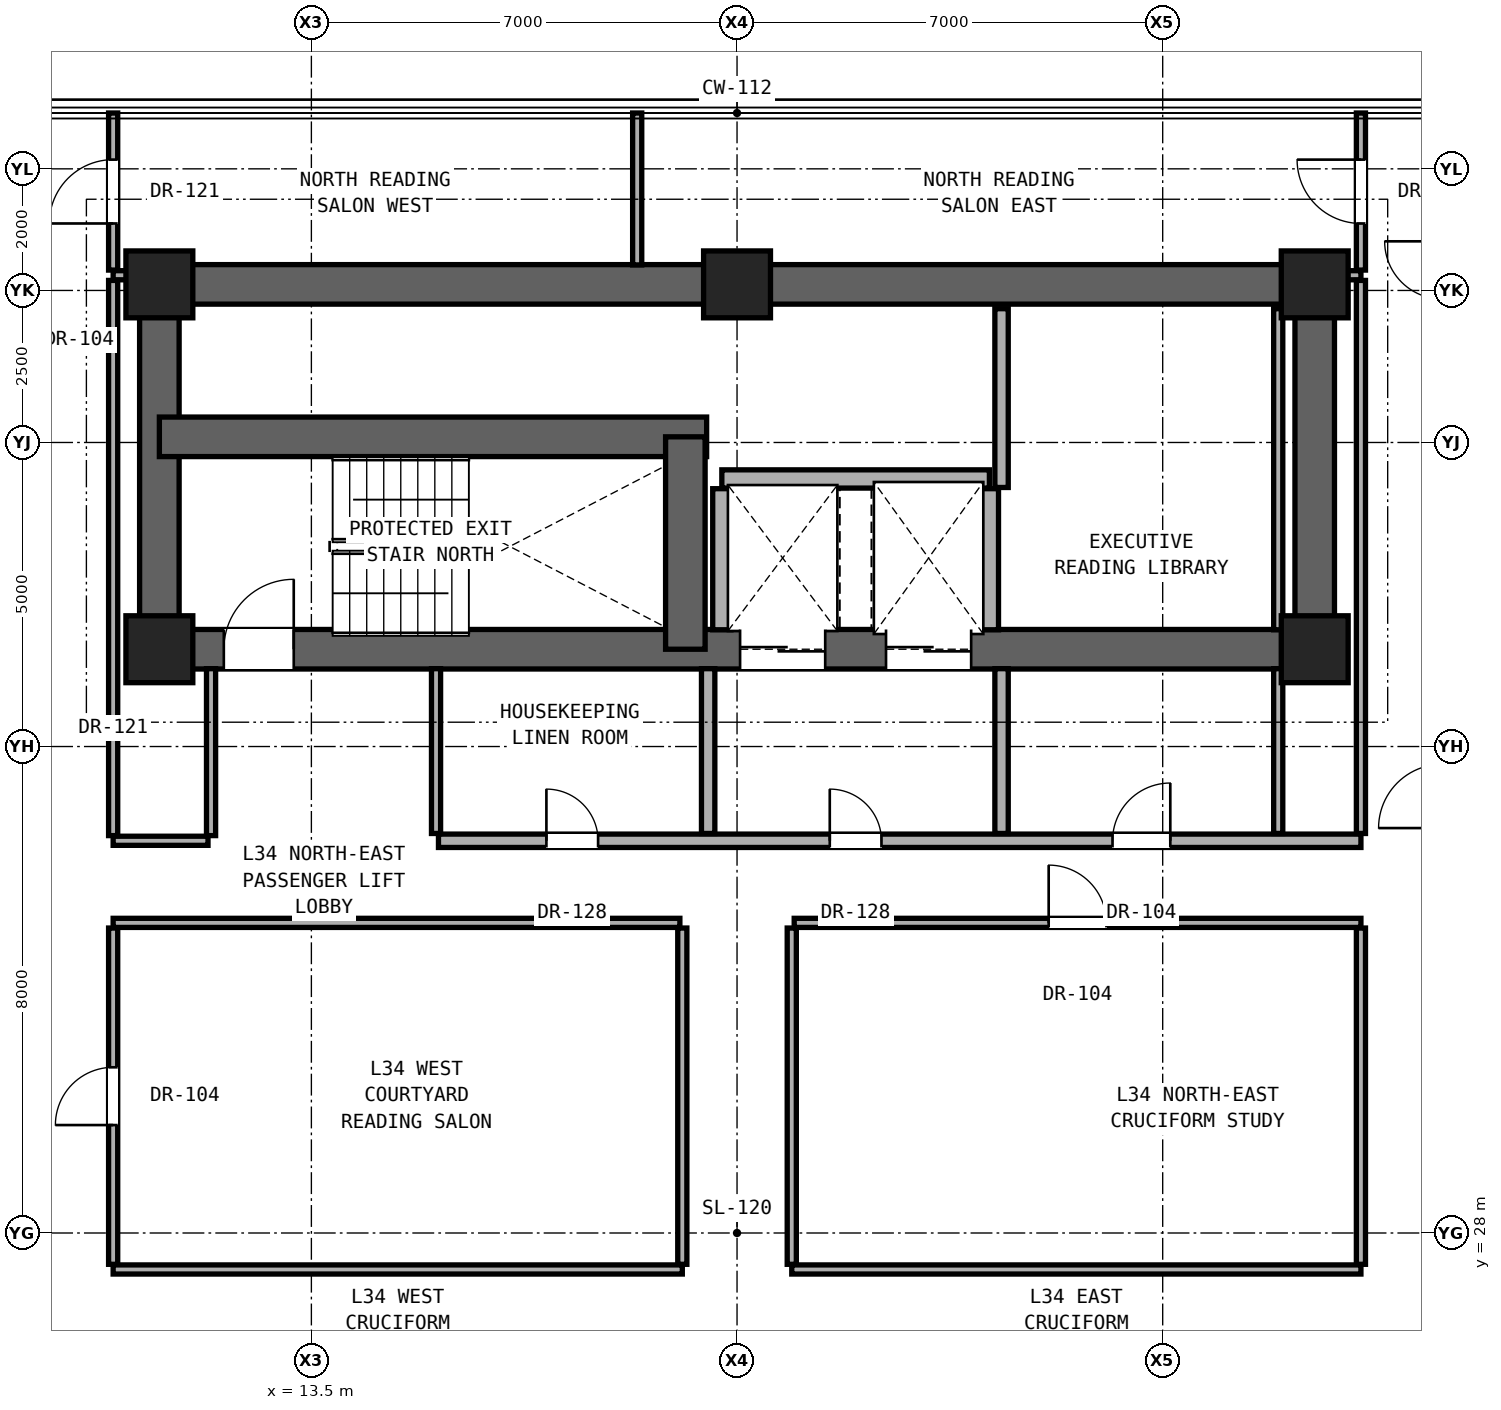
"""IFC4 building model, lengths in metres.
Left out: names, types, materials, properties, quantities, classifications, styles, units other than length and angle.
Written with IfcOpenShell. Run it as: python <this file> out.ifc"""

import sys

from ifc_helpers import new_model, si_unit, direction, frame, frame_2d, origin, origin_2d, place, context, subcontext, project, spatial, rectangle, extrude, element, fill, save


model = new_model("IFC4")
c1 = context("Model", 3, precision=1e-05, world=origin(), true_north=direction((0.0, 1.0)))
c2 = subcontext(c1, "Body", "Model", "MODEL_VIEW")
j1 = project(units=[si_unit("LENGTHUNIT", "METRE"), si_unit("PLANEANGLEUNIT", "RADIAN")], contexts=[c1])
p1 = place(None, origin())
s1 = spatial("IfcSite", under=j1, at=p1, CompositionType="ELEMENT")
p2 = place(p1, origin())
s2 = spatial("IfcBuilding", under=s1, at=p2, CompositionType="ELEMENT")
p3 = place(p2, frame((0.0, 0.0, 121.4)))
s3 = spatial("IfcBuildingStorey", under=s2, at=p3, CompositionType="ELEMENT", Elevation=121.4)
for number, where, z_axis, x_axis in (
    (1, (11.0, 37.6, 0.0), (0.0, 0.0, 1.0), (1.0, 0.0, 0.0)),
    (2, (30.0, 37.6, 0.0), (0.0, 0.0, 1.0), (1.0, 0.0, 0.0)),
    (3, (11.0, 43.6, 0.0), (0.0, 0.0, 1.0), (1.0, 0.0, 0.0)),
    (4, (20.5, 43.6, 0.0), (0.0, 0.0, 1.0), (1.0, 0.0, 0.0)),
    (5, (30.0, 43.6, 0.0), (0.0, 0.0, 1.0), (1.0, 0.0, 0.0)),
):
    element("IfcColumn", number, at=place(p3, frame(where, z_axis=z_axis, x_axis=x_axis)), inside=s3, PredefinedType="COLUMN", context=c2, shape_type="SweptSolid", body=[
        extrude(rectangle(XDim=1.1, YDim=1.1, at=origin_2d()), origin(), (0.0, 0.0, 1.0), 3.3),
    ])
p4 = place(p3, frame((11.0, 43.6, 0.0), z_axis=(0.0, 0.0, 1.0), x_axis=(1.0, 0.0, 0.0)))
e6 = element("IfcWall", 6, at=p4, inside=s3, PredefinedType="SHEAR", context=c2, shape_type="SweptSolid", body=[
    extrude(rectangle(XDim=19.0, YDim=0.65, at=frame_2d((9.5, 0.0))), origin(), (0.0, 0.0, 1.0), 3.08),
])
for number, where, z_axis, x_axis in (
    (7, (11.0, 37.6, 0.0), (0.0, 0.0, 1.0), (0.0, 1.0, 0.0)),
    (8, (30.0, 37.6, 0.0), (0.0, 0.0, 1.0), (0.0, 1.0, 0.0)),
):
    element("IfcWall", number, at=place(p3, frame(where, z_axis=z_axis, x_axis=x_axis)), inside=s3, PredefinedType="SHEAR", context=c2, shape_type="SweptSolid", body=[
        extrude(rectangle(XDim=6.0, YDim=0.65, at=frame_2d((3.0, 0.0))), origin(), (0.0, 0.0, 1.0), 3.08),
    ])
p5 = place(p3, frame((11.0, 37.6, 0.0), z_axis=(0.0, 0.0, 1.0), x_axis=(1.0, 0.0, 0.0)))
e9 = element("IfcWall", 9, at=p5, inside=s3, PredefinedType="SHEAR", context=c2, shape_type="SweptSolid", body=[
    extrude(rectangle(XDim=19.0, YDim=0.65, at=frame_2d((9.5, 0.0))), origin(), (0.0, 0.0, 1.0), 3.08),
])
p6 = place(p5, frame((1.06, 0.0, 0.0)))
e10 = element("IfcOpeningElement", 10, at=p6, cuts=e9, PredefinedType="OPENING", context=c2, shape_type="SweptSolid", body=[
    extrude(rectangle(XDim=1.15, YDim=2.2, at=frame_2d((0.575, 1.1))), frame((0.0, 0.335, 0.0), z_axis=(0.0, -1.0, 0.0), x_axis=(1.0, 0.0, 0.0)), (0.0, 0.0, 1.0), 0.67),
])
p7 = place(p5, frame((9.55, 0.0, 0.0)))
e11 = element("IfcOpeningElement", 11, at=p7, cuts=e9, PredefinedType="OPENING", context=c2, shape_type="SweptSolid", body=[
    extrude(rectangle(XDim=1.4, YDim=2.35, at=frame_2d((0.7, 1.175))), frame((0.0, 0.335, 0.0), z_axis=(0.0, -1.0, 0.0), x_axis=(1.0, 0.0, 0.0)), (0.0, 0.0, 1.0), 0.67),
])
p8 = place(p5, frame((11.95, 0.0, 0.0)))
e12 = element("IfcOpeningElement", 12, at=p8, cuts=e9, PredefinedType="OPENING", context=c2, shape_type="SweptSolid", body=[
    extrude(rectangle(XDim=1.4, YDim=2.35, at=frame_2d((0.7, 1.175))), frame((0.0, 0.335, 0.0), z_axis=(0.0, -1.0, 0.0), x_axis=(1.0, 0.0, 0.0)), (0.0, 0.0, 1.0), 0.67),
])
p9 = place(p3, frame((11.0, 41.093, 0.0), z_axis=(0.0, 0.0, 1.0), x_axis=(1.0, 0.0, 0.0)))
e13 = element("IfcWall", 13, at=p9, inside=s3, PredefinedType="SHEAR", context=c2, shape_type="SweptSolid", body=[
    extrude(rectangle(XDim=9.0, YDim=0.65, at=frame_2d((4.5, 0.0))), origin(), (0.0, 0.0, 1.0), 3.08),
])
p10 = place(p3, frame((19.65, 37.6, 0.0), z_axis=(0.0, 0.0, 1.0), x_axis=(0.0, 1.0, 0.0)))
e14 = element("IfcWall", 14, at=p10, inside=s3, PredefinedType="SHEAR", context=c2, shape_type="SweptSolid", body=[
    extrude(rectangle(XDim=3.493, YDim=0.65, at=frame_2d((1.747, 0.0))), origin(), (0.0, 0.0, 1.0), 3.08),
])
for number, where, z_axis, x_axis in (
    (15, (10.24, 27.4, 0.0), (0.0, 0.0, 1.0), (1.0, 0.0, 0.0)),
    (16, (21.4, 27.4, 0.0), (0.0, 0.0, 1.0), (1.0, 0.0, 0.0)),
):
    element("IfcWall", number, at=place(p3, frame(where, z_axis=z_axis, x_axis=x_axis)), inside=s3, PredefinedType="PARTITIONING", context=c2, shape_type="SweptSolid", body=[
        extrude(rectangle(XDim=9.36, YDim=0.15, at=frame_2d((4.68, 0.0))), origin(), (0.0, 0.0, 1.0), 2.216),
    ])
p11 = place(p3, frame((10.24, 33.1, 0.0), z_axis=(0.0, 0.0, 1.0), x_axis=(1.0, 0.0, 0.0)))
e17 = element("IfcWall", 17, at=p11, inside=s3, PredefinedType="PARTITIONING", context=c2, shape_type="SweptSolid", body=[
    extrude(rectangle(XDim=9.32, YDim=0.15, at=frame_2d((4.66, 0.0))), origin(), (0.0, 0.0, 1.0), 2.216),
])
p12 = place(p3, frame((21.44, 33.1, 0.0), z_axis=(0.0, 0.0, 1.0), x_axis=(1.0, 0.0, 0.0)))
e18 = element("IfcWall", 18, at=p12, inside=s3, PredefinedType="PARTITIONING", context=c2, shape_type="SweptSolid", body=[
    extrude(rectangle(XDim=9.32, YDim=0.15, at=frame_2d((4.66, 0.0))), origin(), (0.0, 0.0, 1.0), 2.216),
])
p13 = place(p12, frame((4.185, 0.0, 0.0)))
e19 = element("IfcOpeningElement", 19, at=p13, cuts=e18, PredefinedType="OPENING", context=c2, shape_type="SweptSolid", body=[
    extrude(rectangle(XDim=0.95, YDim=2.15, at=frame_2d((0.475, 1.075))), frame((0.0, 0.085, 0.0), z_axis=(0.0, -1.0, 0.0), x_axis=(1.0, 0.0, 0.0)), (0.0, 0.0, 1.0), 0.17),
])
p14 = place(p3, frame((10.24, 34.45, 0.0), z_axis=(0.0, 0.0, 1.0), x_axis=(1.0, 0.0, 0.0)))
e20 = element("IfcWall", 20, at=p14, inside=s3, PredefinedType="PARTITIONING", context=c2, shape_type="SweptSolid", body=[
    extrude(rectangle(XDim=1.56, YDim=0.15, at=frame_2d((0.78, 0.0))), origin(), (0.0, 0.0, 1.0), 2.216),
])
p15 = place(p3, frame((15.59, 34.45, 0.0), z_axis=(0.0, 0.0, 1.0), x_axis=(1.0, 0.0, 0.0)))
e21 = element("IfcWall", 21, at=p15, inside=s3, PredefinedType="SOLIDWALL", context=c2, shape_type="SweptSolid", body=[
    extrude(rectangle(XDim=15.17, YDim=0.22, at=frame_2d((7.585, 0.0))), origin(), (0.0, 0.0, 1.0), 2.216),
])
p16 = place(p15, frame((6.435, 0.0, 0.0)))
e22 = element("IfcOpeningElement", 22, at=p16, cuts=e21, PredefinedType="OPENING", context=c2, shape_type="SweptSolid", body=[
    extrude(rectangle(XDim=0.85, YDim=2.01, at=frame_2d((0.425, 1.005))), frame((0.0, 0.12, 0.0), z_axis=(0.0, -1.0, 0.0), x_axis=(1.0, 0.0, 0.0)), (0.0, 0.0, 1.0), 0.24),
])
p17 = place(p15, frame((11.085, 0.0, 0.0)))
e23 = element("IfcOpeningElement", 23, at=p17, cuts=e21, PredefinedType="OPENING", context=c2, shape_type="SweptSolid", body=[
    extrude(rectangle(XDim=0.95, YDim=2.15, at=frame_2d((0.475, 1.075))), frame((0.0, 0.12, 0.0), z_axis=(0.0, -1.0, 0.0), x_axis=(1.0, 0.0, 0.0)), (0.0, 0.0, 1.0), 0.24),
])
p18 = place(p15, frame((1.775, 0.0, 0.0)))
e24 = element("IfcOpeningElement", 24, at=p18, cuts=e21, PredefinedType="OPENING", context=c2, shape_type="SweptSolid", body=[
    extrude(rectangle(XDim=0.85, YDim=2.01, at=frame_2d((0.425, 1.005))), frame((0.0, 0.12, 0.0), z_axis=(0.0, -1.0, 0.0), x_axis=(1.0, 0.0, 0.0)), (0.0, 0.0, 1.0), 0.24),
])
p19 = place(p3, frame((20.25, 40.4, 0.0), z_axis=(0.0, 0.0, 1.0), x_axis=(1.0, 0.0, 0.0)))
e25 = element("IfcWall", 25, at=p19, inside=s3, PredefinedType="SOLIDWALL", context=c2, shape_type="SweptSolid", body=[
    extrude(rectangle(XDim=4.4, YDim=0.3, at=frame_2d((2.2, 0.0))), origin(), (0.0, 0.0, 1.0), 3.08),
])
for number, where, z_axis, x_axis in (
    (26, (10.24, 43.75, 0.0), (0.0, 0.0, 1.0), (1.0, 0.0, 0.0)),
    (27, (30.32, 43.75, 0.0), (0.0, 0.0, 1.0), (1.0, 0.0, 0.0)),
):
    element("IfcWall", number, at=place(p3, frame(where, z_axis=z_axis, x_axis=x_axis)), inside=s3, PredefinedType="PARTITIONING", context=c2, shape_type="SweptSolid", body=[
        extrude(rectangle(XDim=0.44, YDim=0.15, at=frame_2d((0.22, 0.0))), origin(), (0.0, 0.0, 1.0), 3.08),
    ])
p20 = place(p3, frame((10.24, 27.485, 0.0), z_axis=(0.0, 0.0, 1.0), x_axis=(0.0, 1.0, 0.0)))
e28 = element("IfcWall", 28, at=p20, inside=s3, PredefinedType="PARTITIONING", context=c2, shape_type="SweptSolid", body=[
    extrude(rectangle(XDim=5.53, YDim=0.15, at=frame_2d((2.765, 0.0))), origin(), (0.0, 0.0, 1.0), 2.299),
])
p21 = place(p20, frame((2.29, 0.0, 0.0)))
e29 = element("IfcOpeningElement", 29, at=p21, cuts=e28, PredefinedType="OPENING", context=c2, shape_type="SweptSolid", body=[
    extrude(rectangle(XDim=0.95, YDim=2.15, at=frame_2d((0.475, 1.075))), frame((0.0, 0.085, 0.0), z_axis=(0.0, -1.0, 0.0), x_axis=(1.0, 0.0, 0.0)), (0.0, 0.0, 1.0), 0.17),
])
p22 = place(p3, frame((10.24, 34.535, 0.0), z_axis=(0.0, 0.0, 1.0), x_axis=(0.0, 1.0, 0.0)))
e30 = element("IfcWall", 30, at=p22, inside=s3, PredefinedType="PARTITIONING", context=c2, shape_type="SweptSolid", body=[
    extrude(rectangle(XDim=9.13, YDim=0.15, at=frame_2d((4.565, 0.0))), origin(), (0.0, 0.0, 1.0), 2.456),
])
p23 = place(p3, frame((10.24, 43.835, 0.0), z_axis=(0.0, 0.0, 1.0), x_axis=(0.0, 1.0, 0.0)))
e31 = element("IfcWall", 31, at=p23, inside=s3, PredefinedType="PARTITIONING", context=c2, shape_type="SweptSolid", body=[
    extrude(rectangle(XDim=2.583, YDim=0.15, at=frame_2d((1.292, 0.0))), origin(), (0.0, 0.0, 1.0), 3.08),
])
p24 = place(p23, frame((0.767, 0.0, 0.0)))
e32 = element("IfcOpeningElement", 32, at=p24, cuts=e31, PredefinedType="OPENING", context=c2, shape_type="SweptSolid", body=[
    extrude(rectangle(XDim=1.05, YDim=2.2, at=frame_2d((0.525, 1.1))), frame((0.0, 0.085, 0.0), z_axis=(0.0, -1.0, 0.0), x_axis=(1.0, 0.0, 0.0)), (0.0, 0.0, 1.0), 0.17),
])
p25 = place(p3, frame((11.85, 34.535, 0.0), z_axis=(0.0, 0.0, 1.0), x_axis=(0.0, 1.0, 0.0)))
e33 = element("IfcWall", 33, at=p25, inside=s3, PredefinedType="PARTITIONING", context=c2, shape_type="SweptSolid", body=[
    extrude(rectangle(XDim=2.745, YDim=0.15, at=frame_2d((1.373, 0.0))), origin(), (0.0, 0.0, 1.0), 3.08),
])
p26 = place(p3, frame((15.55, 34.57, 0.0), z_axis=(0.0, 0.0, 1.0), x_axis=(0.0, 1.0, 0.0)))
e34 = element("IfcWall", 34, at=p26, inside=s3, PredefinedType="PARTITIONING", context=c2, shape_type="SweptSolid", body=[
    extrude(rectangle(XDim=2.71, YDim=0.15, at=frame_2d((1.355, 0.0))), origin(), (0.0, 0.0, 1.0), 2.609),
])
p27 = place(p3, frame((18.858, 43.92, 0.0), z_axis=(0.0, 0.0, 1.0), x_axis=(0.0, 1.0, 0.0)))
e35 = element("IfcWall", 35, at=p27, inside=s3, PredefinedType="PARTITIONING", context=c2, shape_type="SweptSolid", body=[
    extrude(rectangle(XDim=2.498, YDim=0.15, at=frame_2d((1.249, 0.0))), origin(), (0.0, 0.0, 1.0), 3.08),
])
p28 = place(p3, frame((19.6, 27.485, 0.0), z_axis=(0.0, 0.0, 1.0), x_axis=(0.0, 1.0, 0.0)))
e36 = element("IfcWall", 36, at=p28, inside=s3, PredefinedType="PARTITIONING", context=c2, shape_type="SweptSolid", body=[
    extrude(rectangle(XDim=5.53, YDim=0.15, at=frame_2d((2.765, 0.0))), origin(), (0.0, 0.0, 1.0), 2.216),
])
p29 = place(p3, frame((20.025, 34.57, 0.0), z_axis=(0.0, 0.0, 1.0), x_axis=(0.0, 1.0, 0.0)))
e37 = element("IfcWall", 37, at=p29, inside=s3, PredefinedType="SOLIDWALL", context=c2, shape_type="SweptSolid", body=[
    extrude(rectangle(XDim=2.71, YDim=0.22, at=frame_2d((1.355, 0.0))), origin(), (0.0, 0.0, 1.0), 3.08),
])
p30 = place(p3, frame((20.25, 37.92, 0.0), z_axis=(0.0, 0.0, 1.0), x_axis=(0.0, 1.0, 0.0)))
e38 = element("IfcWall", 38, at=p30, inside=s3, PredefinedType="SOLIDWALL", context=c2, shape_type="SweptSolid", body=[
    extrude(rectangle(XDim=2.32, YDim=0.3, at=frame_2d((1.16, 0.0))), origin(), (0.0, 0.0, 1.0), 3.08),
])
p31 = place(p3, frame((21.4, 27.485, 0.0), z_axis=(0.0, 0.0, 1.0), x_axis=(0.0, 1.0, 0.0)))
e39 = element("IfcWall", 39, at=p31, inside=s3, PredefinedType="PARTITIONING", context=c2, shape_type="SweptSolid", body=[
    extrude(rectangle(XDim=5.53, YDim=0.15, at=frame_2d((2.765, 0.0))), origin(), (0.0, 0.0, 1.0), 2.216),
])
p32 = place(p3, frame((24.65, 37.92, 0.0), z_axis=(0.0, 0.0, 1.0), x_axis=(0.0, 1.0, 0.0)))
e40 = element("IfcWall", 40, at=p32, inside=s3, PredefinedType="SOLIDWALL", context=c2, shape_type="SweptSolid", body=[
    extrude(rectangle(XDim=2.32, YDim=0.3, at=frame_2d((1.16, 0.0))), origin(), (0.0, 0.0, 1.0), 3.08),
])
p33 = place(p3, frame((24.85, 34.57, 0.0), z_axis=(0.0, 0.0, 1.0), x_axis=(0.0, 1.0, 0.0)))
e41 = element("IfcWall", 41, at=p33, inside=s3, PredefinedType="SOLIDWALL", context=c2, shape_type="SweptSolid", body=[
    extrude(rectangle(XDim=2.71, YDim=0.22, at=frame_2d((1.355, 0.0))), origin(), (0.0, 0.0, 1.0), 3.08),
])
p34 = place(p3, frame((24.85, 40.26, 0.0), z_axis=(0.0, 0.0, 1.0), x_axis=(0.0, 1.0, 0.0)))
e42 = element("IfcWall", 42, at=p34, inside=s3, PredefinedType="SOLIDWALL", context=c2, shape_type="SweptSolid", body=[
    extrude(rectangle(XDim=2.94, YDim=0.22, at=frame_2d((1.47, 0.0))), origin(), (0.0, 0.0, 1.0), 3.08),
])
p35 = place(p3, frame((29.4, 34.57, 0.0), z_axis=(0.0, 0.0, 1.0), x_axis=(0.0, 1.0, 0.0)))
e43 = element("IfcWall", 43, at=p35, inside=s3, PredefinedType="PARTITIONING", context=c2, shape_type="SweptSolid", body=[
    extrude(rectangle(XDim=2.71, YDim=0.15, at=frame_2d((1.355, 0.0))), origin(), (0.0, 0.0, 1.0), 3.08),
])
p36 = place(p3, frame((29.4, 37.92, 0.0), z_axis=(0.0, 0.0, 1.0), x_axis=(0.0, 1.0, 0.0)))
e44 = element("IfcWall", 44, at=p36, inside=s3, PredefinedType="PARTITIONING", context=c2, shape_type="SweptSolid", body=[
    extrude(rectangle(XDim=5.28, YDim=0.15, at=frame_2d((2.64, 0.0))), origin(), (0.0, 0.0, 1.0), 3.08),
])
p37 = place(p3, frame((30.76, 27.485, 0.0), z_axis=(0.0, 0.0, 1.0), x_axis=(0.0, 1.0, 0.0)))
e45 = element("IfcWall", 45, at=p37, inside=s3, PredefinedType="PARTITIONING", context=c2, shape_type="SweptSolid", body=[
    extrude(rectangle(XDim=5.53, YDim=0.15, at=frame_2d((2.765, 0.0))), origin(), (0.0, 0.0, 1.0), 2.299),
])
p38 = place(p3, frame((30.76, 34.57, 0.0), z_axis=(0.0, 0.0, 1.0), x_axis=(0.0, 1.0, 0.0)))
e46 = element("IfcWall", 46, at=p38, inside=s3, PredefinedType="PARTITIONING", context=c2, shape_type="SweptSolid", body=[
    extrude(rectangle(XDim=9.095, YDim=0.15, at=frame_2d((4.547, 0.0))), origin(), (0.0, 0.0, 1.0), 2.456),
])
p39 = place(p3, frame((30.76, 43.835, 0.0), z_axis=(0.0, 0.0, 1.0), x_axis=(0.0, 1.0, 0.0)))
e47 = element("IfcWall", 47, at=p39, inside=s3, PredefinedType="PARTITIONING", context=c2, shape_type="SweptSolid", body=[
    extrude(rectangle(XDim=2.583, YDim=0.15, at=frame_2d((1.292, 0.0))), origin(), (0.0, 0.0, 1.0), 3.08),
])
p40 = place(p39, frame((0.767, 0.0, 0.0)))
e48 = element("IfcOpeningElement", 48, at=p40, cuts=e47, PredefinedType="OPENING", context=c2, shape_type="SweptSolid", body=[
    extrude(rectangle(XDim=1.05, YDim=2.2, at=frame_2d((0.525, 1.1))), frame((0.0, 0.085, 0.0), z_axis=(0.0, -1.0, 0.0), x_axis=(1.0, 0.0, 0.0)), (0.0, 0.0, 1.0), 0.17),
])
p41 = place(p6, origin())
e49 = element("IfcDoor", 49, at=p41, inside=s3, OperationType="SINGLE_SWING_RIGHT", PredefinedType="DOOR", context=c2, shape_type="SweptSolid", body=[
    extrude(rectangle(XDim=1.15, YDim=2.2, at=frame_2d((0.575, 1.1))), frame((0.0, 0.025, 0.0), z_axis=(0.0, -1.0, 0.0), x_axis=(1.0, 0.0, 0.0)), (0.0, 0.0, 1.0), 0.05),
])
fill(e10, e49)
p42 = place(p16, origin())
e50 = element("IfcDoor", 50, at=p42, inside=s3, OperationType="SINGLE_SWING_LEFT", PredefinedType="DOOR", context=c2, shape_type="SweptSolid", body=[
    extrude(rectangle(XDim=0.85, YDim=2.01, at=frame_2d((0.425, 1.005))), frame((0.0, 0.025, 0.0), z_axis=(0.0, -1.0, 0.0), x_axis=(1.0, 0.0, 0.0)), (0.0, 0.0, 1.0), 0.05),
])
fill(e22, e50)
p43 = place(p17, origin())
e51 = element("IfcDoor", 51, at=p43, inside=s3, OperationType="SINGLE_SWING_RIGHT", PredefinedType="DOOR", context=c2, shape_type="SweptSolid", body=[
    extrude(rectangle(XDim=0.95, YDim=2.15, at=frame_2d((0.475, 1.075))), frame((0.0, 0.025, 0.0), z_axis=(0.0, -1.0, 0.0), x_axis=(1.0, 0.0, 0.0)), (0.0, 0.0, 1.0), 0.05),
])
fill(e23, e51)
p44 = place(p18, origin())
e52 = element("IfcDoor", 52, at=p44, inside=s3, OperationType="SINGLE_SWING_LEFT", PredefinedType="DOOR", context=c2, shape_type="SweptSolid", body=[
    extrude(rectangle(XDim=0.85, YDim=2.01, at=frame_2d((0.425, 1.005))), frame((0.0, 0.025, 0.0), z_axis=(0.0, -1.0, 0.0), x_axis=(1.0, 0.0, 0.0)), (0.0, 0.0, 1.0), 0.05),
])
fill(e24, e52)
p45 = place(p21, origin())
e53 = element("IfcDoor", 53, at=p45, inside=s3, OperationType="SINGLE_SWING_LEFT", PredefinedType="DOOR", context=c2, shape_type="SweptSolid", body=[
    extrude(rectangle(XDim=0.95, YDim=2.15, at=frame_2d((0.475, 1.075))), frame((0.0, 0.025, 0.0), z_axis=(0.0, -1.0, 0.0), x_axis=(1.0, 0.0, 0.0)), (0.0, 0.0, 1.0), 0.05),
])
fill(e29, e53)
p46 = place(p13, origin())
e54 = element("IfcDoor", 54, at=p46, inside=s3, OperationType="SINGLE_SWING_LEFT", PredefinedType="DOOR", context=c2, shape_type="SweptSolid", body=[
    extrude(rectangle(XDim=0.95, YDim=2.15, at=frame_2d((0.475, 1.075))), frame((0.0, 0.025, 0.0), z_axis=(0.0, -1.0, 0.0), x_axis=(1.0, 0.0, 0.0)), (0.0, 0.0, 1.0), 0.05),
])
fill(e19, e54)
p47 = place(p24, origin())
e55 = element("IfcDoor", 55, at=p47, inside=s3, OperationType="SINGLE_SWING_LEFT", PredefinedType="DOOR", context=c2, shape_type="SweptSolid", body=[
    extrude(rectangle(XDim=1.05, YDim=2.2, at=frame_2d((0.525, 1.1))), frame((0.0, 0.025, 0.0), z_axis=(0.0, -1.0, 0.0), x_axis=(1.0, 0.0, 0.0)), (0.0, 0.0, 1.0), 0.05),
])
fill(e32, e55)
p48 = place(p40, origin())
e56 = element("IfcDoor", 56, at=p48, inside=s3, OperationType="SINGLE_SWING_RIGHT", PredefinedType="DOOR", context=c2, shape_type="SweptSolid", body=[
    extrude(rectangle(XDim=1.05, YDim=2.2, at=frame_2d((0.525, 1.1))), frame((0.0, 0.025, 0.0), z_axis=(0.0, -1.0, 0.0), x_axis=(1.0, 0.0, 0.0)), (0.0, 0.0, 1.0), 0.05),
])
fill(e48, e56)
p49 = place(p7, origin())
e57 = element("IfcDoor", 57, at=p49, inside=s3, OperationType="DOUBLE_DOOR_SLIDING", PredefinedType="DOOR", context=c2, shape_type="SweptSolid", body=[
    extrude(rectangle(XDim=1.4, YDim=2.35, at=frame_2d((0.7, 1.175))), frame((0.0, 0.025, 0.0), z_axis=(0.0, -1.0, 0.0), x_axis=(1.0, 0.0, 0.0)), (0.0, 0.0, 1.0), 0.05),
])
fill(e11, e57)
p50 = place(p8, origin())
e58 = element("IfcDoor", 58, at=p50, inside=s3, OperationType="DOUBLE_DOOR_SLIDING", PredefinedType="DOOR", context=c2, shape_type="SweptSolid", body=[
    extrude(rectangle(XDim=1.4, YDim=2.35, at=frame_2d((0.7, 1.175))), frame((0.0, 0.025, 0.0), z_axis=(0.0, -1.0, 0.0), x_axis=(1.0, 0.0, 0.0)), (0.0, 0.0, 1.0), 0.05),
])
fill(e12, e58)
save(model, sys.argv[1])
